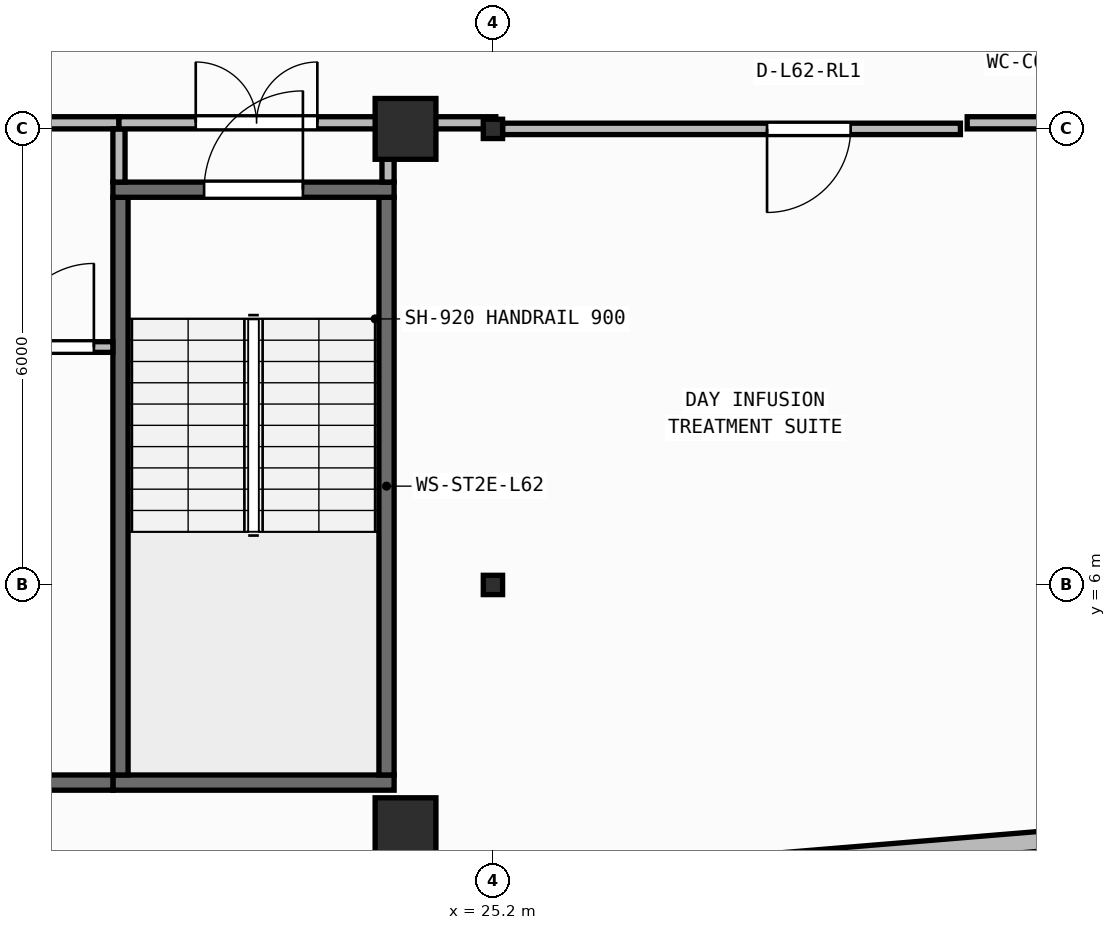
"""IFC4 building model, lengths in metres.
Left out: names, types, materials, properties, quantities, classifications, styles, units other than length and angle.
Written with IfcOpenShell. Run it as: python <this file> out.ifc"""

import sys

from ifc_helpers import new_model, si_unit, direction, frame, frame_2d, origin, origin_2d, place, context, subcontext, project, spatial, rectangle, i_section, extrude, element, fill, save


model = new_model("IFC4")
c1 = context("Model", 3, precision=1e-05, world=origin(), true_north=direction((0.0, 1.0)))
c2 = subcontext(c1, "Body", "Model", "MODEL_VIEW")
j1 = project(units=[si_unit("LENGTHUNIT", "METRE"), si_unit("PLANEANGLEUNIT", "RADIAN")], contexts=[c1])
p1 = place(None, origin())
s1 = spatial("IfcSite", under=j1, at=p1, CompositionType="ELEMENT")
p2 = place(p1, origin())
s2 = spatial("IfcBuilding", under=s1, at=p2, CompositionType="ELEMENT")
p3 = place(p2, frame((0.0, 0.0, 252.6)))
s3 = spatial("IfcBuildingStorey", under=s2, at=p3, CompositionType="ELEMENT", Elevation=252.6)
p4 = place(p3, frame((24.05, 2.8, 0.0), z_axis=(0.0, 0.0, 1.0), x_axis=(1.0, 0.0, 0.0)))
e1 = element("IfcColumn", 1, at=p4, inside=s3, PredefinedType="COLUMN", context=c2, shape_type="SweptSolid", body=[
    extrude(rectangle(XDim=0.8, YDim=0.8, at=origin_2d()), origin(), (0.0, 0.0, 1.0), 3.95),
])
p5 = place(p3, frame((25.2, 6.0, 0.0), z_axis=(0.0, 0.0, 1.0), x_axis=(1.0, 0.0, 0.0)))
e2 = element("IfcColumn", 2, at=p5, inside=s3, PredefinedType="COLUMN", context=c2, shape_type="SweptSolid", body=[
    extrude(i_section(OverallWidth=0.254, OverallDepth=0.254, WebThickness=0.009, FlangeThickness=0.014, FilletRadius=0.013, at=origin_2d()), origin(), (0.0, 0.0, 1.0), 3.95),
])
p6 = place(p3, frame((24.05, 12.0, 0.0), z_axis=(0.0, 0.0, 1.0), x_axis=(1.0, 0.0, 0.0)))
e3 = element("IfcColumn", 3, at=p6, inside=s3, PredefinedType="COLUMN", context=c2, shape_type="SweptSolid", body=[
    extrude(rectangle(XDim=0.8, YDim=0.8, at=origin_2d()), origin(), (0.0, 0.0, 1.0), 3.95),
])
p7 = place(p3, frame((25.2, 12.0, 0.0), z_axis=(0.0, 0.0, 1.0), x_axis=(1.0, 0.0, 0.0)))
e4 = element("IfcColumn", 4, at=p7, inside=s3, PredefinedType="COLUMN", context=c2, shape_type="SweptSolid", body=[
    extrude(i_section(OverallWidth=0.254, OverallDepth=0.254, WebThickness=0.009, FlangeThickness=0.014, FilletRadius=0.013, at=origin_2d()), origin(), (0.0, 0.0, 1.0), 3.95),
])
p8 = place(p3, frame((2.66, 0.174, 0.0), z_axis=(0.0, 0.0, 1.0), x_axis=(0.996611813627, 0.082248969229, 0.0)))
e5 = element("IfcWall", 5, at=p8, inside=s3, PredefinedType="STANDARD", context=c2, shape_type="SweptSolid", body=[
    extrude(rectangle(XDim=41.019, YDim=0.26, at=frame_2d((20.51, 0.0))), origin(), (0.0, 0.0, 1.0), 3.71),
])
p9 = place(p8, frame((19.31, 0.0, 0.9)))
e6 = element("IfcOpeningElement", 6, at=p9, cuts=e5, PredefinedType="OPENING", context=c2, shape_type="SweptSolid", body=[
    extrude(rectangle(XDim=2.4, YDim=1.65, at=frame_2d((1.2, 0.825))), frame((0.0, 0.14, 0.0), z_axis=(0.0, -1.0, 0.0), x_axis=(1.0, 0.0, 0.0)), (0.0, 0.0, 1.0), 0.28),
])
p10 = place(p3, frame((20.2, 3.4, 0.0), z_axis=(0.0, 0.0, 1.0), x_axis=(1.0, 0.0, 0.0)))
e7 = element("IfcWall", 7, at=p10, inside=s3, PredefinedType="SHEAR", context=c2, shape_type="SweptSolid", body=[
    extrude(rectangle(XDim=3.7, YDim=0.2, at=frame_2d((1.85, 0.0))), origin(), (0.0, 0.0, 1.0), 3.71),
])
for number, where, z_axis, x_axis in (
    (8, (20.3, 3.5, 0.0), (0.0, 0.0, 1.0), (0.0, 1.0, 0.0)),
    (9, (23.8, 3.5, 0.0), (0.0, 0.0, 1.0), (0.0, 1.0, 0.0)),
):
    element("IfcWall", number, at=place(p3, frame(where, z_axis=z_axis, x_axis=x_axis)), inside=s3, PredefinedType="SHEAR", context=c2, shape_type="SweptSolid", body=[
        extrude(rectangle(XDim=7.6, YDim=0.2, at=frame_2d((3.8, 0.0))), origin(), (0.0, 0.0, 1.0), 3.71),
    ])
p11 = place(p3, frame((20.2, 11.2, 0.0), z_axis=(0.0, 0.0, 1.0), x_axis=(1.0, 0.0, 0.0)))
e10 = element("IfcWall", 10, at=p11, inside=s3, PredefinedType="SHEAR", context=c2, shape_type="SweptSolid", body=[
    extrude(rectangle(XDim=3.7, YDim=0.2, at=frame_2d((1.85, 0.0))), origin(), (0.0, 0.0, 1.0), 3.71),
])
p12 = place(p11, frame((1.2, 0.0, 0.0)))
e11 = element("IfcOpeningElement", 11, at=p12, cuts=e10, PredefinedType="OPENING", context=c2, shape_type="SweptSolid", body=[
    extrude(rectangle(XDim=1.3, YDim=2.15, at=frame_2d((0.65, 1.075))), frame((0.0, 0.11, 0.0), z_axis=(0.0, -1.0, 0.0), x_axis=(1.0, 0.0, 0.0)), (0.0, 0.0, 1.0), 0.22),
])
p13 = place(p3, frame((6.5, 3.4, 0.0), z_axis=(0.0, 0.0, 1.0), x_axis=(1.0, 0.0, 0.0)))
e12 = element("IfcWall", 12, at=p13, inside=s3, PredefinedType="SHEAR", context=c2, shape_type="SweptSolid", body=[
    extrude(rectangle(XDim=13.7, YDim=0.2, at=frame_2d((6.85, 0.0))), origin(), (0.0, 0.0, 1.0), 3.71),
])
p14 = place(p3, frame((18.61, 9.13, 0.0), z_axis=(0.0, 0.0, 1.0), x_axis=(1.0, 0.0, 0.0)))
e13 = element("IfcWall", 13, at=p14, inside=s3, PredefinedType="PARTITIONING", context=c2, shape_type="SweptSolid", body=[
    extrude(rectangle(XDim=1.59, YDim=0.14, at=frame_2d((0.795, 0.0))), origin(), (0.0, 0.0, 1.0), 3.71),
])
p15 = place(p14, frame((0.24, 0.0, 0.0)))
e14 = element("IfcOpeningElement", 14, at=p15, cuts=e13, PredefinedType="OPENING", context=c2, shape_type="SweptSolid", body=[
    extrude(rectangle(XDim=1.1, YDim=2.1, at=frame_2d((0.55, 1.05))), frame((0.0, 0.08, 0.0), z_axis=(0.0, -1.0, 0.0), x_axis=(1.0, 0.0, 0.0)), (0.0, 0.0, 1.0), 0.16),
])
p16 = place(p3, frame((12.58, 12.08, 0.0), z_axis=(0.0, 0.0, 1.0), x_axis=(1.0, 0.0, 0.0)))
e15 = element("IfcWall", 15, at=p16, inside=s3, PredefinedType="PARTITIONING", context=c2, shape_type="SweptSolid", body=[
    extrude(rectangle(XDim=7.7, YDim=0.16, at=frame_2d((3.85, 0.0))), origin(), (0.0, 0.0, 1.0), 3.157),
])
p17 = place(p16, frame((3.05, 0.0, 0.0)))
e16 = element("IfcOpeningElement", 16, at=p17, cuts=e15, PredefinedType="OPENING", context=c2, shape_type="SweptSolid", body=[
    extrude(rectangle(XDim=1.6, YDim=2.05, at=frame_2d((0.8, 1.025))), frame((0.0, 0.09, 0.0), z_axis=(0.0, -1.0, 0.0), x_axis=(1.0, 0.0, 0.0)), (0.0, 0.0, 1.0), 0.18),
])
p18 = place(p3, frame((20.28, 11.3, 0.0), z_axis=(0.0, 0.0, 1.0), x_axis=(0.0, 1.0, 0.0)))
e17 = element("IfcWall", 17, at=p18, inside=s3, PredefinedType="PARTITIONING", context=c2, shape_type="SweptSolid", body=[
    extrude(rectangle(XDim=0.7, YDim=0.16, at=frame_2d((0.35, 0.0))), origin(), (0.0, 0.0, 1.0), 3.71),
])
p19 = place(p3, frame((20.28, 12.08, 0.0), z_axis=(0.0, 0.0, 1.0), x_axis=(1.0, 0.0, 0.0)))
e18 = element("IfcWall", 18, at=p19, inside=s3, PredefinedType="PARTITIONING", context=c2, shape_type="SweptSolid", body=[
    extrude(rectangle(XDim=3.62, YDim=0.16, at=frame_2d((1.81, 0.0))), origin(), (0.0, 0.0, 1.0), 3.157),
])
p20 = place(p19, frame((1.01, 0.0, 0.0)))
e19 = element("IfcOpeningElement", 19, at=p20, cuts=e18, PredefinedType="OPENING", context=c2, shape_type="SweptSolid", body=[
    extrude(rectangle(XDim=1.6, YDim=2.05, at=frame_2d((0.8, 1.025))), frame((0.0, 0.09, 0.0), z_axis=(0.0, -1.0, 0.0), x_axis=(1.0, 0.0, 0.0)), (0.0, 0.0, 1.0), 0.18),
])
p21 = place(p3, frame((23.82, 11.3, 0.0), z_axis=(0.0, 0.0, 1.0), x_axis=(0.0, 1.0, 0.0)))
e20 = element("IfcWall", 20, at=p21, inside=s3, PredefinedType="PARTITIONING", context=c2, shape_type="SweptSolid", body=[
    extrude(rectangle(XDim=0.7, YDim=0.16, at=frame_2d((0.35, 0.0))), origin(), (0.0, 0.0, 1.0), 3.71),
])
p22 = place(p3, frame((31.35, 12.0, 0.0), z_axis=(0.0, 0.0, 1.0), x_axis=(-1.0, 0.0, 0.0)))
e21 = element("IfcWall", 21, at=p22, inside=s3, PredefinedType="PARTITIONING", context=c2, shape_type="SweptSolid", body=[
    extrude(rectangle(XDim=6.023, YDim=0.15, at=frame_2d((3.012, 0.0))), origin(), (0.0, 0.0, 1.0), 3.157),
])
p23 = place(p22, frame((1.444, 0.0, 0.0)))
e22 = element("IfcOpeningElement", 22, at=p23, cuts=e21, PredefinedType="OPENING", context=c2, shape_type="SweptSolid", body=[
    extrude(rectangle(XDim=1.1, YDim=2.1, at=frame_2d((0.55, 1.05))), frame((0.0, 0.085, 0.0), z_axis=(0.0, -1.0, 0.0), x_axis=(1.0, 0.0, 0.0)), (0.0, 0.0, 1.0), 0.17),
])
p24 = place(p3, frame((24.02, 12.08, 0.0), z_axis=(0.0, 0.0, 1.0), x_axis=(1.0, 0.0, 0.0)))
e23 = element("IfcWall", 23, at=p24, inside=s3, PredefinedType="PARTITIONING", context=c2, shape_type="SweptSolid", body=[
    extrude(rectangle(XDim=1.218, YDim=0.16, at=frame_2d((0.609, 0.0))), origin(), (0.0, 0.0, 1.0), 3.157),
])
p25 = place(p3, frame((31.439, 12.08, 0.0), z_axis=(0.0, 0.0, 1.0), x_axis=(1.0, 0.0, 0.0)))
e24 = element("IfcWall", 24, at=p25, inside=s3, PredefinedType="PARTITIONING", context=c2, shape_type="SweptSolid", body=[
    extrude(rectangle(XDim=2.198, YDim=0.16, at=frame_2d((1.099, 0.0))), origin(), (0.0, 0.0, 1.0), 3.157),
])
p26 = place(p12, origin())
e25 = element("IfcDoor", 25, at=p26, inside=s3, OperationType="SINGLE_SWING_RIGHT", PredefinedType="DOOR", context=c2, shape_type="SweptSolid", body=[
    extrude(rectangle(XDim=1.3, YDim=2.15, at=frame_2d((0.65, 1.075))), frame((0.0, 0.025, 0.0), z_axis=(0.0, -1.0, 0.0), x_axis=(1.0, 0.0, 0.0)), (0.0, 0.0, 1.0), 0.05),
])
fill(e11, e25)
p27 = place(p15, origin())
e26 = element("IfcDoor", 26, at=p27, inside=s3, OperationType="SINGLE_SWING_RIGHT", PredefinedType="DOOR", context=c2, shape_type="SweptSolid", body=[
    extrude(rectangle(XDim=1.1, YDim=2.1, at=frame_2d((0.55, 1.05))), frame((0.0, 0.025, 0.0), z_axis=(0.0, -1.0, 0.0), x_axis=(1.0, 0.0, 0.0)), (0.0, 0.0, 1.0), 0.05),
])
fill(e14, e26)
p28 = place(p20, origin())
e27 = element("IfcDoor", 27, at=p28, inside=s3, OperationType="DOUBLE_DOOR_SINGLE_SWING", PredefinedType="DOOR", context=c2, shape_type="SweptSolid", body=[
    extrude(rectangle(XDim=1.6, YDim=2.05, at=frame_2d((0.8, 1.025))), frame((0.0, 0.025, 0.0), z_axis=(0.0, -1.0, 0.0), x_axis=(1.0, 0.0, 0.0)), (0.0, 0.0, 1.0), 0.05),
])
fill(e19, e27)
p29 = place(p23, origin())
e28 = element("IfcDoor", 28, at=p29, inside=s3, OperationType="SINGLE_SWING_RIGHT", PredefinedType="DOOR", context=c2, shape_type="SweptSolid", body=[
    extrude(rectangle(XDim=1.1, YDim=2.1, at=frame_2d((0.55, 1.05))), frame((0.0, 0.025, 0.0), z_axis=(0.0, -1.0, 0.0), x_axis=(1.0, 0.0, 0.0)), (0.0, 0.0, 1.0), 0.05),
])
fill(e22, e28)
save(model, sys.argv[1])
